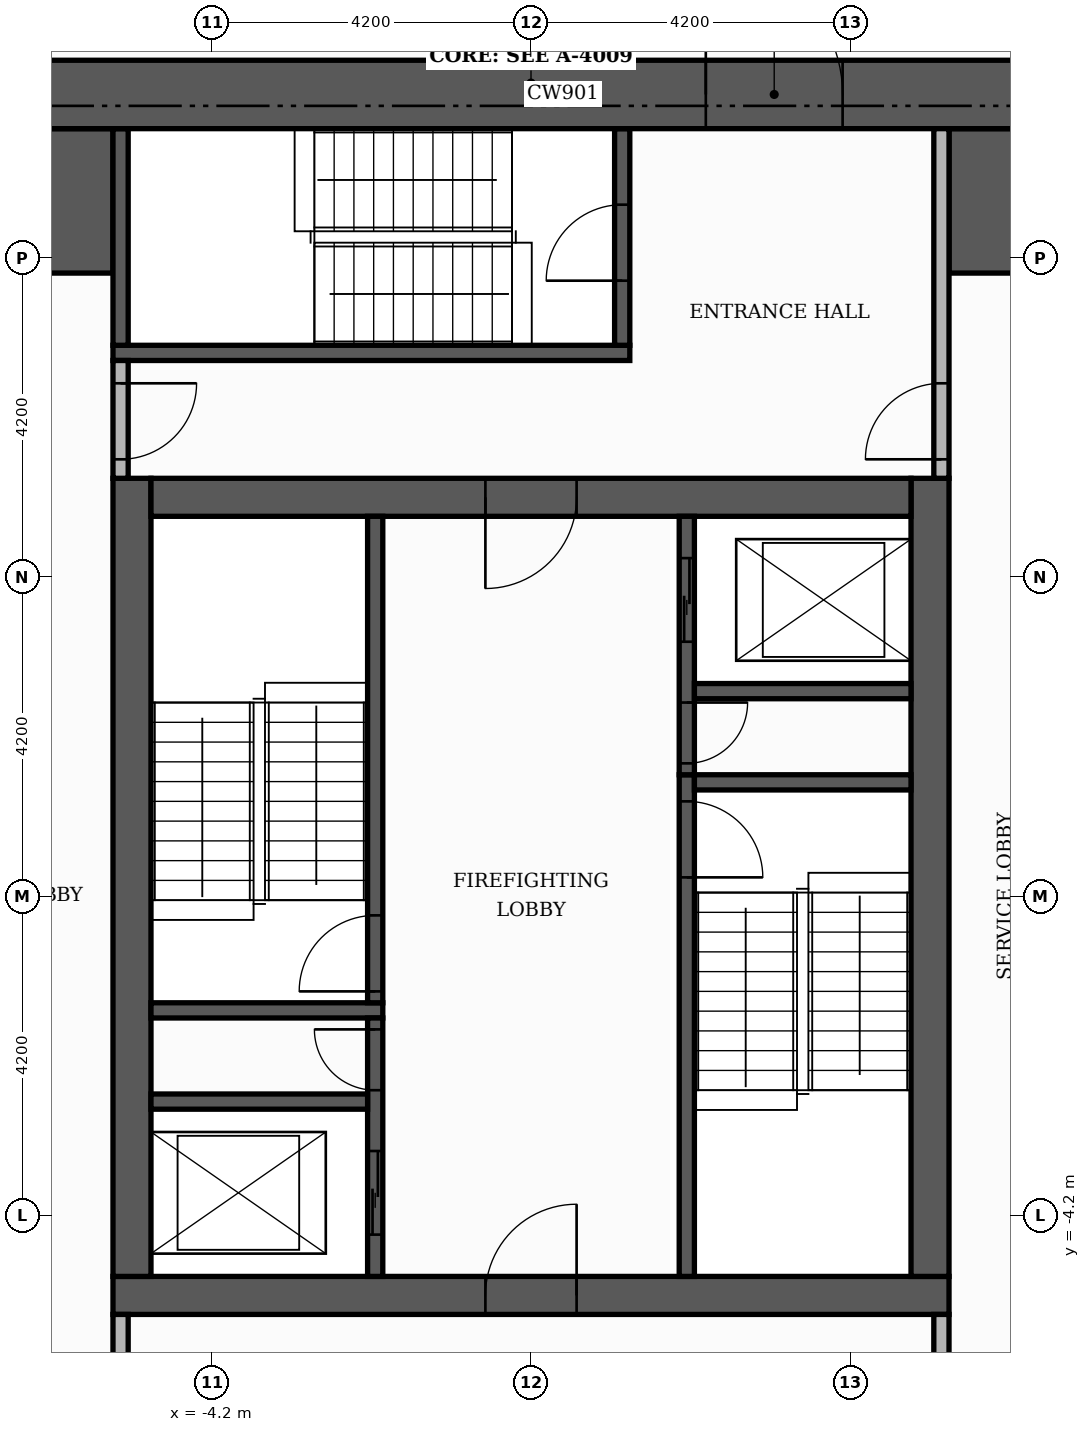
"""IFC4 building model, lengths in metres.
Left out: names, types, materials, properties, quantities, classifications, styles, units other than length and angle.
Written with IfcOpenShell. Run it as: python <this file> out.ifc"""

import sys

from ifc_helpers import new_model, si_unit, direction, frame, frame_2d, origin, place, context, subcontext, project, spatial, rectangle, extrude, element, fill, save


model = new_model("IFC4")
c1 = context("Model", 3, precision=1e-05, world=origin(), true_north=direction((0.0, 1.0)))
c2 = subcontext(c1, "Body", "Model", "MODEL_VIEW")
j1 = project(units=[si_unit("LENGTHUNIT", "METRE"), si_unit("PLANEANGLEUNIT", "RADIAN")], contexts=[c1])
p1 = place(None, origin())
s1 = spatial("IfcSite", under=j1, at=p1, CompositionType="ELEMENT")
p2 = place(p1, origin())
s2 = spatial("IfcBuilding", under=s1, at=p2, CompositionType="ELEMENT")
p3 = place(p2, frame((0.0, 0.0, 46.5)))
s3 = spatial("IfcBuildingStorey", under=s2, at=p3, CompositionType="ELEMENT", Elevation=46.5)
p4 = place(p3, frame((-5.5, -5.25, 0.0), z_axis=(0.0, 0.0, 1.0), x_axis=(1.0, 0.0, 0.0)))
e1 = element("IfcWall", 1, at=p4, inside=s3, PredefinedType="SHEAR", context=c2, shape_type="SweptSolid", body=[
    extrude(rectangle(XDim=11.0, YDim=0.5, at=frame_2d((5.5, 0.0))), origin(), (0.0, 0.0, 1.0), 3.48),
])
p5 = place(p4, frame((4.9, 0.0, 0.0)))
e2 = element("IfcOpeningElement", 2, at=p5, cuts=e1, PredefinedType="OPENING", context=c2, shape_type="SweptSolid", body=[
    extrude(rectangle(XDim=1.2, YDim=2.1, at=frame_2d((0.6, 1.05))), frame((0.0, 0.26, 0.0), z_axis=(0.0, -1.0, 0.0), x_axis=(1.0, 0.0, 0.0)), (0.0, 0.0, 1.0), 0.52),
])
for number, where, z_axis, x_axis in (
    (3, (-5.25, -5.0, 0.0), (0.0, 0.0, 1.0), (0.0, 1.0, 0.0)),
    (4, (5.25, -5.0, 0.0), (0.0, 0.0, 1.0), (0.0, 1.0, 0.0)),
):
    element("IfcWall", number, at=place(p3, frame(where, z_axis=z_axis, x_axis=x_axis)), inside=s3, PredefinedType="SHEAR", context=c2, shape_type="SweptSolid", body=[
        extrude(rectangle(XDim=10.5, YDim=0.5, at=frame_2d((5.25, 0.0))), origin(), (0.0, 0.0, 1.0), 3.48),
    ])
p6 = place(p3, frame((-5.0, 5.25, 0.0), z_axis=(0.0, 0.0, 1.0), x_axis=(1.0, 0.0, 0.0)))
e5 = element("IfcWall", 5, at=p6, inside=s3, PredefinedType="SHEAR", context=c2, shape_type="SweptSolid", body=[
    extrude(rectangle(XDim=10.0, YDim=0.5, at=frame_2d((5.0, 0.0))), origin(), (0.0, 0.0, 1.0), 3.48),
])
p7 = place(p6, frame((4.4, 0.0, 0.0)))
e6 = element("IfcOpeningElement", 6, at=p7, cuts=e5, PredefinedType="OPENING", context=c2, shape_type="SweptSolid", body=[
    extrude(rectangle(XDim=1.2, YDim=2.1, at=frame_2d((0.6, 1.05))), frame((0.0, 0.26, 0.0), z_axis=(0.0, -1.0, 0.0), x_axis=(1.0, 0.0, 0.0)), (0.0, 0.0, 1.0), 0.52),
])
for number, where, z_axis, x_axis in (
    (7, (-10.1, 9.15, 0.0), (0.0, 0.0, 1.0), (1.0, 0.0, 0.0)),
    (8, (5.5, 9.15, 0.0), (0.0, 0.0, 1.0), (1.0, 0.0, 0.0)),
):
    element("IfcWall", number, at=place(p3, frame(where, z_axis=z_axis, x_axis=x_axis)), inside=s3, PredefinedType="SHEAR", context=c2, shape_type="SweptSolid", body=[
        extrude(rectangle(XDim=4.6, YDim=1.9, at=frame_2d((2.3, 0.0))), origin(), (0.0, 0.0, 1.0), 3.48),
    ])
p8 = place(p3, frame((2.05, -5.0, 0.0), z_axis=(0.0, 0.0, 1.0), x_axis=(0.0, 1.0, 0.0)))
e9 = element("IfcWall", 9, at=p8, inside=s3, PredefinedType="SHEAR", context=c2, shape_type="SweptSolid", body=[
    extrude(rectangle(XDim=6.6, YDim=0.2, at=frame_2d((3.3, 0.0))), origin(), (0.0, 0.0, 1.0), 3.48),
])
p9 = place(p8, frame((5.25, 0.0, 0.0)))
e10 = element("IfcOpeningElement", 10, at=p9, cuts=e9, PredefinedType="OPENING", context=c2, shape_type="SweptSolid", body=[
    extrude(rectangle(XDim=1.0, YDim=2.1, at=frame_2d((0.5, 1.05))), frame((0.0, 0.11, 0.0), z_axis=(0.0, -1.0, 0.0), x_axis=(1.0, 0.0, 0.0)), (0.0, 0.0, 1.0), 0.22),
])
p10 = place(p3, frame((-5.0, -1.5, 0.0), z_axis=(0.0, 0.0, 1.0), x_axis=(1.0, 0.0, 0.0)))
e11 = element("IfcWall", 11, at=p10, inside=s3, PredefinedType="SHEAR", context=c2, shape_type="SweptSolid", body=[
    extrude(rectangle(XDim=3.05, YDim=0.2, at=frame_2d((1.525, 0.0))), origin(), (0.0, 0.0, 1.0), 3.48),
])
p11 = place(p3, frame((-2.05, -1.4, 0.0), z_axis=(0.0, 0.0, 1.0), x_axis=(0.0, 1.0, 0.0)))
e12 = element("IfcWall", 12, at=p11, inside=s3, PredefinedType="SHEAR", context=c2, shape_type="SweptSolid", body=[
    extrude(rectangle(XDim=6.4, YDim=0.2, at=frame_2d((3.2, 0.0))), origin(), (0.0, 0.0, 1.0), 3.48),
])
p12 = place(p11, frame((0.15, 0.0, 0.0)))
e13 = element("IfcOpeningElement", 13, at=p12, cuts=e12, PredefinedType="OPENING", context=c2, shape_type="SweptSolid", body=[
    extrude(rectangle(XDim=1.0, YDim=2.1, at=frame_2d((0.5, 1.05))), frame((0.0, 0.11, 0.0), z_axis=(0.0, -1.0, 0.0), x_axis=(1.0, 0.0, 0.0)), (0.0, 0.0, 1.0), 0.22),
])
p13 = place(p3, frame((2.15, 1.5, 0.0), z_axis=(0.0, 0.0, 1.0), x_axis=(1.0, 0.0, 0.0)))
e14 = element("IfcWall", 14, at=p13, inside=s3, PredefinedType="SHEAR", context=c2, shape_type="SweptSolid", body=[
    extrude(rectangle(XDim=2.85, YDim=0.2, at=frame_2d((1.425, 0.0))), origin(), (0.0, 0.0, 1.0), 3.48),
])
p14 = place(p3, frame((-5.5, 7.15, 0.0), z_axis=(0.0, 0.0, 1.0), x_axis=(1.0, 0.0, 0.0)))
e15 = element("IfcWall", 15, at=p14, inside=s3, PredefinedType="SHEAR", context=c2, shape_type="SweptSolid", body=[
    extrude(rectangle(XDim=6.8, YDim=0.2, at=frame_2d((3.4, 0.0))), origin(), (0.0, 0.0, 1.0), 3.48),
])
p15 = place(p3, frame((-5.4, 7.25, 0.0), z_axis=(0.0, 0.0, 1.0), x_axis=(0.0, 1.0, 0.0)))
e16 = element("IfcWall", 16, at=p15, inside=s3, PredefinedType="SHEAR", context=c2, shape_type="SweptSolid", body=[
    extrude(rectangle(XDim=2.85, YDim=0.2, at=frame_2d((1.425, 0.0))), origin(), (0.0, 0.0, 1.0), 3.48),
])
p16 = place(p3, frame((1.2, 7.25, 0.0), z_axis=(0.0, 0.0, 1.0), x_axis=(0.0, 1.0, 0.0)))
e17 = element("IfcWall", 17, at=p16, inside=s3, PredefinedType="SHEAR", context=c2, shape_type="SweptSolid", body=[
    extrude(rectangle(XDim=2.85, YDim=0.2, at=frame_2d((1.425, 0.0))), origin(), (0.0, 0.0, 1.0), 3.48),
])
p17 = place(p16, frame((0.85, 0.0, 0.0)))
e18 = element("IfcOpeningElement", 18, at=p17, cuts=e17, PredefinedType="OPENING", context=c2, shape_type="SweptSolid", body=[
    extrude(rectangle(XDim=1.0, YDim=2.1, at=frame_2d((0.5, 1.05))), frame((0.0, 0.11, 0.0), z_axis=(0.0, -1.0, 0.0), x_axis=(1.0, 0.0, 0.0)), (0.0, 0.0, 1.0), 0.22),
])
p18 = place(p3, frame((-2.05, -5.0, 0.0), z_axis=(0.0, 0.0, 1.0), x_axis=(0.0, 1.0, 0.0)))
e19 = element("IfcWall", 19, at=p18, inside=s3, PredefinedType="SHEAR", context=c2, shape_type="SweptSolid", body=[
    extrude(rectangle(XDim=3.4, YDim=0.2, at=frame_2d((1.7, 0.0))), origin(), (0.0, 0.0, 1.0), 3.48),
])
p19 = place(p18, frame((0.55, 0.0, 0.0)))
e20 = element("IfcOpeningElement", 20, at=p19, cuts=e19, PredefinedType="OPENING", context=c2, shape_type="SweptSolid", body=[
    extrude(rectangle(XDim=1.1, YDim=2.1, at=frame_2d((0.55, 1.05))), frame((0.0, 0.11, 0.0), z_axis=(0.0, -1.0, 0.0), x_axis=(1.0, 0.0, 0.0)), (0.0, 0.0, 1.0), 0.22),
])
p20 = place(p18, frame((2.45, 0.0, 0.0)))
e21 = element("IfcOpeningElement", 21, at=p20, cuts=e19, PredefinedType="OPENING", context=c2, shape_type="SweptSolid", body=[
    extrude(rectangle(XDim=0.8, YDim=2.1, at=frame_2d((0.4, 1.05))), frame((0.0, 0.11, 0.0), z_axis=(0.0, -1.0, 0.0), x_axis=(1.0, 0.0, 0.0)), (0.0, 0.0, 1.0), 0.22),
])
p21 = place(p3, frame((-5.0, -2.7, 0.0), z_axis=(0.0, 0.0, 1.0), x_axis=(1.0, 0.0, 0.0)))
e22 = element("IfcWall", 22, at=p21, inside=s3, PredefinedType="SHEAR", context=c2, shape_type="SweptSolid", body=[
    extrude(rectangle(XDim=2.85, YDim=0.2, at=frame_2d((1.425, 0.0))), origin(), (0.0, 0.0, 1.0), 3.48),
])
p22 = place(p3, frame((2.05, 1.6, 0.0), z_axis=(0.0, 0.0, 1.0), x_axis=(0.0, 1.0, 0.0)))
e23 = element("IfcWall", 23, at=p22, inside=s3, PredefinedType="SHEAR", context=c2, shape_type="SweptSolid", body=[
    extrude(rectangle(XDim=3.4, YDim=0.2, at=frame_2d((1.7, 0.0))), origin(), (0.0, 0.0, 1.0), 3.48),
])
p23 = place(p22, frame((1.75, 0.0, 0.0)))
e24 = element("IfcOpeningElement", 24, at=p23, cuts=e23, PredefinedType="OPENING", context=c2, shape_type="SweptSolid", body=[
    extrude(rectangle(XDim=1.1, YDim=2.1, at=frame_2d((0.55, 1.05))), frame((0.0, 0.11, 0.0), z_axis=(0.0, -1.0, 0.0), x_axis=(1.0, 0.0, 0.0)), (0.0, 0.0, 1.0), 0.22),
])
p24 = place(p22, frame((0.15, 0.0, 0.0)))
e25 = element("IfcOpeningElement", 25, at=p24, cuts=e23, PredefinedType="OPENING", context=c2, shape_type="SweptSolid", body=[
    extrude(rectangle(XDim=0.8, YDim=2.1, at=frame_2d((0.4, 1.05))), frame((0.0, 0.11, 0.0), z_axis=(0.0, -1.0, 0.0), x_axis=(1.0, 0.0, 0.0)), (0.0, 0.0, 1.0), 0.22),
])
p25 = place(p3, frame((2.15, 2.7, 0.0), z_axis=(0.0, 0.0, 1.0), x_axis=(1.0, 0.0, 0.0)))
e26 = element("IfcWall", 26, at=p25, inside=s3, PredefinedType="SHEAR", context=c2, shape_type="SweptSolid", body=[
    extrude(rectangle(XDim=2.85, YDim=0.2, at=frame_2d((1.425, 0.0))), origin(), (0.0, 0.0, 1.0), 3.48),
])
p26 = place(p3, frame((-11.0, 10.55, 0.0), z_axis=(0.0, 0.0, 1.0), x_axis=(1.0, 0.0, 0.0)))
e27 = element("IfcWall", 27, at=p26, inside=s3, PredefinedType="SHEAR", context=c2, shape_type="SweptSolid", body=[
    extrude(rectangle(XDim=22.0, YDim=0.9, at=frame_2d((11.0, 0.0))), origin(), (0.0, 0.0, 1.0), 3.48),
])
p27 = place(p26, frame((13.3, 0.0, 0.0)))
e28 = element("IfcOpeningElement", 28, at=p27, cuts=e27, PredefinedType="OPENING", context=c2, shape_type="SweptSolid", body=[
    extrude(rectangle(XDim=1.8, YDim=2.2, at=frame_2d((0.9, 1.1))), frame((0.0, 0.46, 0.0), z_axis=(0.0, -1.0, 0.0), x_axis=(1.0, 0.0, 0.0)), (0.0, 0.0, 1.0), 0.92),
])
p28 = place(p3, frame((-5.4, -10.1, 0.0), z_axis=(0.0, 0.0, 1.0), x_axis=(0.0, 1.0, 0.0)))
e29 = element("IfcWall", 29, at=p28, inside=s3, PredefinedType="PARTITIONING", context=c2, shape_type="SweptSolid", body=[
    extrude(rectangle(XDim=4.6, YDim=0.2, at=frame_2d((2.3, 0.0))), origin(), (0.0, 0.0, 1.0), 3.48),
])
p29 = place(p28, frame((2.9, 0.0, 0.0)))
e30 = element("IfcOpeningElement", 30, at=p29, cuts=e29, PredefinedType="OPENING", context=c2, shape_type="SweptSolid", body=[
    extrude(rectangle(XDim=1.0, YDim=2.1, at=frame_2d((0.5, 1.05))), frame((0.0, 0.11, 0.0), z_axis=(0.0, -1.0, 0.0), x_axis=(1.0, 0.0, 0.0)), (0.0, 0.0, 1.0), 0.22),
])
p30 = place(p3, frame((5.4, -7.9, 0.0), z_axis=(0.0, 0.0, 1.0), x_axis=(0.0, 1.0, 0.0)))
e31 = element("IfcWall", 31, at=p30, inside=s3, PredefinedType="PARTITIONING", context=c2, shape_type="SweptSolid", body=[
    extrude(rectangle(XDim=2.4, YDim=0.2, at=frame_2d((1.2, 0.0))), origin(), (0.0, 0.0, 1.0), 3.48),
])
p31 = place(p30, frame((0.7, 0.0, 0.0)))
e32 = element("IfcOpeningElement", 32, at=p31, cuts=e31, PredefinedType="OPENING", context=c2, shape_type="SweptSolid", body=[
    extrude(rectangle(XDim=1.0, YDim=2.1, at=frame_2d((0.5, 1.05))), frame((0.0, 0.11, 0.0), z_axis=(0.0, -1.0, 0.0), x_axis=(1.0, 0.0, 0.0)), (0.0, 0.0, 1.0), 0.22),
])
p32 = place(p3, frame((-5.4, 5.5, 0.0), z_axis=(0.0, 0.0, 1.0), x_axis=(0.0, 1.0, 0.0)))
e33 = element("IfcWall", 33, at=p32, inside=s3, PredefinedType="PARTITIONING", context=c2, shape_type="SweptSolid", body=[
    extrude(rectangle(XDim=1.55, YDim=0.2, at=frame_2d((0.775, 0.0))), origin(), (0.0, 0.0, 1.0), 3.48),
])
p33 = place(p32, frame((0.25, 0.0, 0.0)))
e34 = element("IfcOpeningElement", 34, at=p33, cuts=e33, PredefinedType="OPENING", context=c2, shape_type="SweptSolid", body=[
    extrude(rectangle(XDim=1.0, YDim=2.1, at=frame_2d((0.5, 1.05))), frame((0.0, 0.11, 0.0), z_axis=(0.0, -1.0, 0.0), x_axis=(1.0, 0.0, 0.0)), (0.0, 0.0, 1.0), 0.22),
])
p34 = place(p3, frame((5.4, 5.5, 0.0), z_axis=(0.0, 0.0, 1.0), x_axis=(0.0, 1.0, 0.0)))
e35 = element("IfcWall", 35, at=p34, inside=s3, PredefinedType="PARTITIONING", context=c2, shape_type="SweptSolid", body=[
    extrude(rectangle(XDim=4.6, YDim=0.2, at=frame_2d((2.3, 0.0))), origin(), (0.0, 0.0, 1.0), 3.48),
])
p35 = place(p34, frame((0.25, 0.0, 0.0)))
e36 = element("IfcOpeningElement", 36, at=p35, cuts=e35, PredefinedType="OPENING", context=c2, shape_type="SweptSolid", body=[
    extrude(rectangle(XDim=1.0, YDim=2.1, at=frame_2d((0.5, 1.05))), frame((0.0, 0.11, 0.0), z_axis=(0.0, -1.0, 0.0), x_axis=(1.0, 0.0, 0.0)), (0.0, 0.0, 1.0), 0.22),
])
p36 = place(p23, origin())
e37 = element("IfcDoor", 37, at=p36, inside=s3, OperationType="SLIDING_TO_LEFT", PredefinedType="DOOR", context=c2, shape_type="SweptSolid", body=[
    extrude(rectangle(XDim=1.1, YDim=2.1, at=frame_2d((0.55, 1.05))), frame((0.0, 0.025, 0.0), z_axis=(0.0, -1.0, 0.0), x_axis=(1.0, 0.0, 0.0)), (0.0, 0.0, 1.0), 0.05),
])
fill(e24, e37)
p37 = place(p19, origin())
e38 = element("IfcDoor", 38, at=p37, inside=s3, OperationType="SLIDING_TO_LEFT", PredefinedType="DOOR", context=c2, shape_type="SweptSolid", body=[
    extrude(rectangle(XDim=1.1, YDim=2.1, at=frame_2d((0.55, 1.05))), frame((0.0, 0.025, 0.0), z_axis=(0.0, -1.0, 0.0), x_axis=(1.0, 0.0, 0.0)), (0.0, 0.0, 1.0), 0.05),
])
fill(e20, e38)
p38 = place(p12, origin())
e39 = element("IfcDoor", 39, at=p38, inside=s3, OperationType="SINGLE_SWING_LEFT", PredefinedType="DOOR", context=c2, shape_type="SweptSolid", body=[
    extrude(rectangle(XDim=1.0, YDim=2.1, at=frame_2d((0.5, 1.05))), frame((0.0, 0.025, 0.0), z_axis=(0.0, -1.0, 0.0), x_axis=(1.0, 0.0, 0.0)), (0.0, 0.0, 1.0), 0.05),
])
fill(e13, e39)
p39 = place(p9, frame((1.0, 0.0, 0.0), z_axis=(0.0, 0.0, 1.0), x_axis=(-1.0, 0.0, 0.0)))
e40 = element("IfcDoor", 40, at=p39, inside=s3, OperationType="SINGLE_SWING_LEFT", PredefinedType="DOOR", context=c2, shape_type="SweptSolid", body=[
    extrude(rectangle(XDim=1.0, YDim=2.1, at=frame_2d((0.5, 1.05))), frame((0.0, 0.025, 0.0), z_axis=(0.0, -1.0, 0.0), x_axis=(1.0, 0.0, 0.0)), (0.0, 0.0, 1.0), 0.05),
])
fill(e10, e40)
p40 = place(p24, frame((0.8, 0.0, 0.0), z_axis=(0.0, 0.0, 1.0), x_axis=(-1.0, 0.0, 0.0)))
e41 = element("IfcDoor", 41, at=p40, inside=s3, OperationType="SINGLE_SWING_RIGHT", PredefinedType="DOOR", context=c2, shape_type="SweptSolid", body=[
    extrude(rectangle(XDim=0.8, YDim=2.1, at=frame_2d((0.4, 1.05))), frame((0.0, 0.025, 0.0), z_axis=(0.0, -1.0, 0.0), x_axis=(1.0, 0.0, 0.0)), (0.0, 0.0, 1.0), 0.05),
])
fill(e25, e41)
p41 = place(p20, origin())
e42 = element("IfcDoor", 42, at=p41, inside=s3, OperationType="SINGLE_SWING_RIGHT", PredefinedType="DOOR", context=c2, shape_type="SweptSolid", body=[
    extrude(rectangle(XDim=0.8, YDim=2.1, at=frame_2d((0.4, 1.05))), frame((0.0, 0.025, 0.0), z_axis=(0.0, -1.0, 0.0), x_axis=(1.0, 0.0, 0.0)), (0.0, 0.0, 1.0), 0.05),
])
fill(e21, e42)
p42 = place(p7, frame((1.2, 0.0, 0.0), z_axis=(0.0, 0.0, 1.0), x_axis=(-1.0, 0.0, 0.0)))
e43 = element("IfcDoor", 43, at=p42, inside=s3, OperationType="SINGLE_SWING_LEFT", PredefinedType="DOOR", context=c2, shape_type="SweptSolid", body=[
    extrude(rectangle(XDim=1.2, YDim=2.1, at=frame_2d((0.6, 1.05))), frame((0.0, 0.025, 0.0), z_axis=(0.0, -1.0, 0.0), x_axis=(1.0, 0.0, 0.0)), (0.0, 0.0, 1.0), 0.05),
])
fill(e6, e43)
p43 = place(p5, origin())
e44 = element("IfcDoor", 44, at=p43, inside=s3, OperationType="SINGLE_SWING_RIGHT", PredefinedType="DOOR", context=c2, shape_type="SweptSolid", body=[
    extrude(rectangle(XDim=1.2, YDim=2.1, at=frame_2d((0.6, 1.05))), frame((0.0, 0.025, 0.0), z_axis=(0.0, -1.0, 0.0), x_axis=(1.0, 0.0, 0.0)), (0.0, 0.0, 1.0), 0.05),
])
fill(e2, e44)
p44 = place(p17, origin())
e45 = element("IfcDoor", 45, at=p44, inside=s3, OperationType="SINGLE_SWING_LEFT", PredefinedType="DOOR", context=c2, shape_type="SweptSolid", body=[
    extrude(rectangle(XDim=1.0, YDim=2.1, at=frame_2d((0.5, 1.05))), frame((0.0, 0.025, 0.0), z_axis=(0.0, -1.0, 0.0), x_axis=(1.0, 0.0, 0.0)), (0.0, 0.0, 1.0), 0.05),
])
fill(e18, e45)
p45 = place(p33, frame((1.0, 0.0, 0.0), z_axis=(0.0, 0.0, 1.0), x_axis=(-1.0, 0.0, 0.0)))
e46 = element("IfcDoor", 46, at=p45, inside=s3, OperationType="SINGLE_SWING_RIGHT", PredefinedType="DOOR", context=c2, shape_type="SweptSolid", body=[
    extrude(rectangle(XDim=1.0, YDim=2.1, at=frame_2d((0.5, 1.05))), frame((0.0, 0.025, 0.0), z_axis=(0.0, -1.0, 0.0), x_axis=(1.0, 0.0, 0.0)), (0.0, 0.0, 1.0), 0.05),
])
fill(e34, e46)
p46 = place(p35, origin())
e47 = element("IfcDoor", 47, at=p46, inside=s3, OperationType="SINGLE_SWING_LEFT", PredefinedType="DOOR", context=c2, shape_type="SweptSolid", body=[
    extrude(rectangle(XDim=1.0, YDim=2.1, at=frame_2d((0.5, 1.05))), frame((0.0, 0.025, 0.0), z_axis=(0.0, -1.0, 0.0), x_axis=(1.0, 0.0, 0.0)), (0.0, 0.0, 1.0), 0.05),
])
fill(e36, e47)
p47 = place(p27, origin())
e48 = element("IfcDoor", 48, at=p47, inside=s3, OperationType="DOUBLE_DOOR_SINGLE_SWING", PredefinedType="DOOR", context=c2, shape_type="SweptSolid", body=[
    extrude(rectangle(XDim=1.8, YDim=2.2, at=frame_2d((0.9, 1.1))), frame((0.0, 0.025, 0.0), z_axis=(0.0, -1.0, 0.0), x_axis=(1.0, 0.0, 0.0)), (0.0, 0.0, 1.0), 0.05),
])
fill(e28, e48)
save(model, sys.argv[1])
